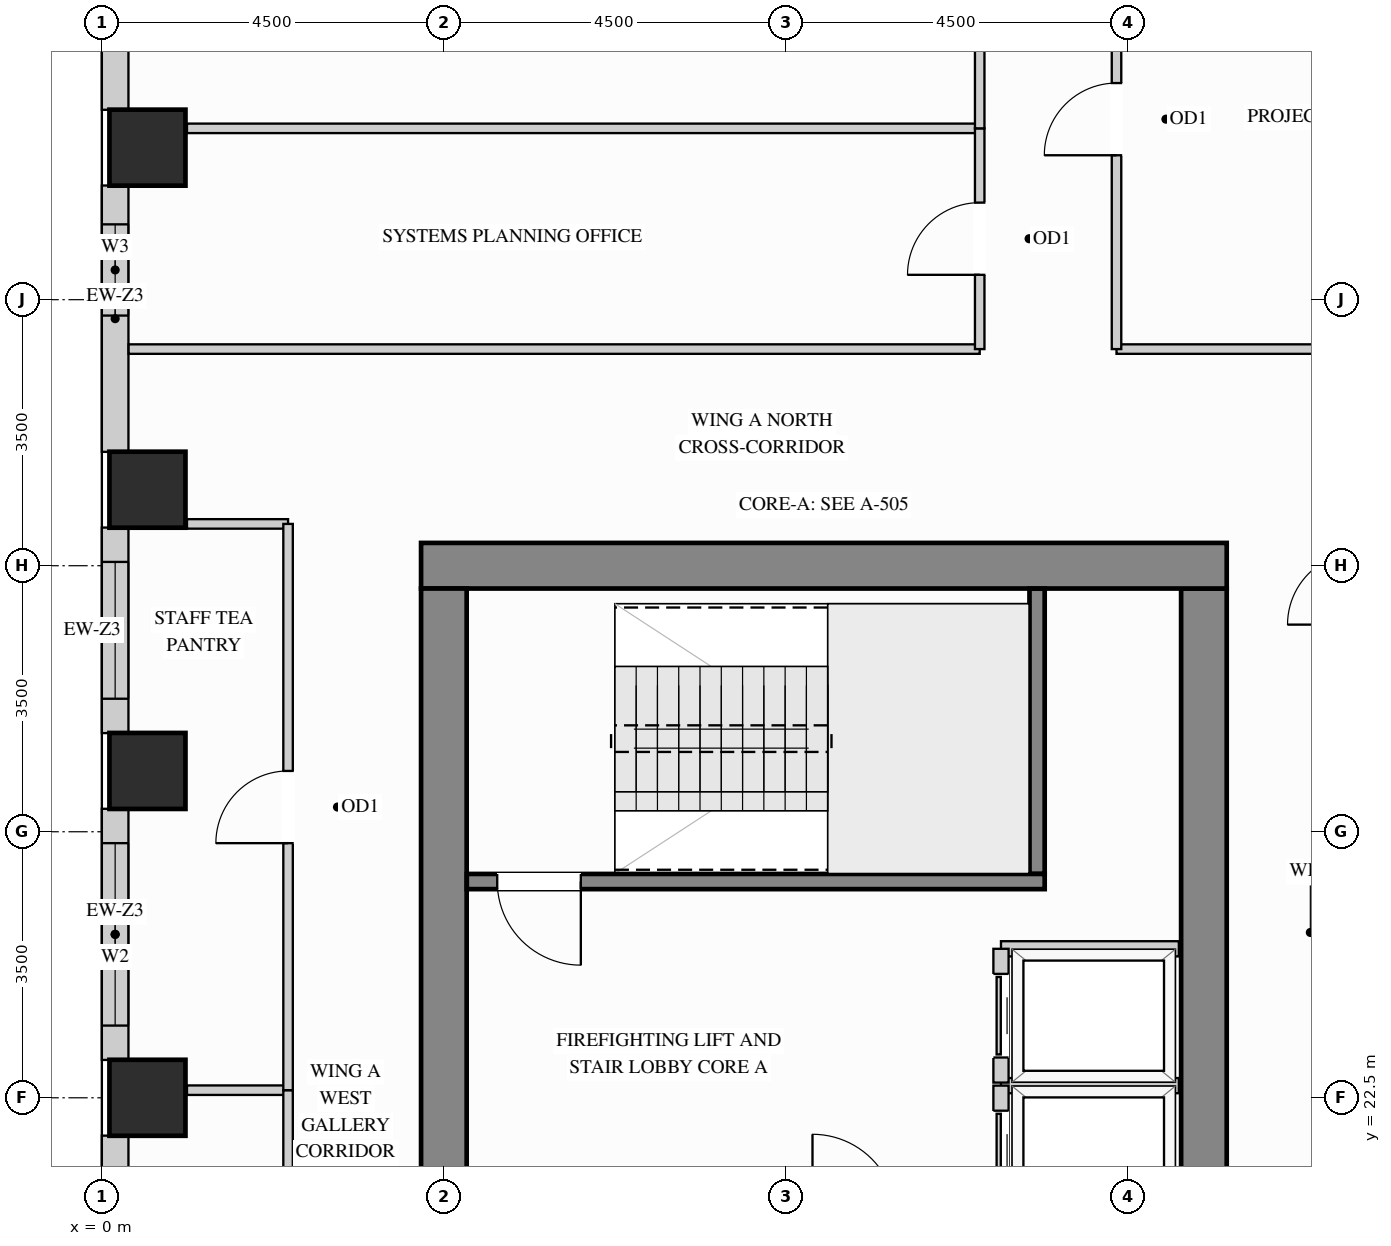
"""IFC4 building model, lengths in metres.
Left out: names, types, materials, properties, quantities, classifications, styles, units other than length and angle.
Written with IfcOpenShell. Run it as: python <this file> out.ifc"""

import sys

from ifc_helpers import new_model, si_unit, direction, frame, frame_2d, origin, origin_2d, place, context, subcontext, project, spatial, rectangle, extrude, source, transform, mapped, element, fill, save


model = new_model("IFC4")
c1 = context("Model", 3, precision=1e-05, world=origin(), true_north=direction((0.0, 1.0)))
c2 = subcontext(c1, "Body", "Model", "MODEL_VIEW")
j1 = project(units=[si_unit("LENGTHUNIT", "METRE"), si_unit("PLANEANGLEUNIT", "RADIAN")], contexts=[c1])
p1 = place(None, origin())
s1 = spatial("IfcSite", under=j1, at=p1, CompositionType="ELEMENT")
p2 = place(p1, origin())
s2 = spatial("IfcBuilding", under=s1, at=p2, CompositionType="ELEMENT")
p3 = place(p2, frame((0.0, 0.0, 146.7)))
s3 = spatial("IfcBuildingStorey", under=s2, at=p3, CompositionType="ELEMENT", Elevation=146.7)
m1 = source(origin(), c2, "Body", "SweptSolid", [
    extrude(rectangle(XDim=1.0, YDim=1.0, at=origin_2d()), origin(), (0.0, 0.0, 1.0), 3.4),
])
for number, where, z_axis, x_axis in (
    (1, (0.6, 22.5, 0.0), (0.0, 0.0, 1.0), (1.0, 0.0, 0.0)),
    (2, (0.6, 26.8, 0.0), (0.0, 0.0, 1.0), (1.0, 0.0, 0.0)),
    (3, (0.6, 30.5, 0.0), (0.0, 0.0, 1.0), (1.0, 0.0, 0.0)),
    (4, (0.6, 35.0, 0.0), (0.0, 0.0, 1.0), (1.0, 0.0, 0.0)),
):
    element("IfcColumn", number, at=place(p3, frame(where, z_axis=z_axis, x_axis=x_axis)), inside=s3, PredefinedType="COLUMN", context=c2, shape_type="MappedRepresentation", body=[
        mapped(m1, transform((0.0, 0.0, 0.0), x_axis=(1.0, 0.0, 0.0), y_axis=(0.0, 1.0, 0.0), z_axis=(0.0, 0.0, 1.0))),
    ])
m2 = source(origin(), c2, "Body", "SweptSolid", [
    extrude(rectangle(XDim=8.32, YDim=0.6, at=frame_2d((4.16, 0.0))), origin(), (0.0, 0.0, 1.0), 3.4),
])
p4 = place(p3, frame((14.5, 20.88, 0.0), z_axis=(0.0, 0.0, 1.0), x_axis=(0.0, 1.0, 0.0)))
e5 = element("IfcWall", 5, at=p4, inside=s3, PredefinedType="SHEAR", context=c2, shape_type="MappedRepresentation", body=[
    mapped(m2, transform((0.0, 0.0, 0.0), x_axis=(1.0, 0.0, 0.0), y_axis=(0.0, 1.0, 0.0), z_axis=(0.0, 0.0, 1.0))),
])
m3 = source(origin(), c2, "Body", "SweptSolid", [
    extrude(rectangle(XDim=10.6, YDim=0.6, at=frame_2d((5.3, 0.0))), origin(), (0.0, 0.0, 1.0), 3.4),
])
p5 = place(p3, frame((4.2, 29.5, 0.0), z_axis=(0.0, 0.0, 1.0), x_axis=(1.0, 0.0, 0.0)))
e6 = element("IfcWall", 6, at=p5, inside=s3, PredefinedType="SHEAR", context=c2, shape_type="MappedRepresentation", body=[
    mapped(m3, transform((0.0, 0.0, 0.0), x_axis=(1.0, 0.0, 0.0), y_axis=(0.0, 1.0, 0.0), z_axis=(0.0, 0.0, 1.0))),
])
m4 = source(origin(), c2, "Body", "SweptSolid", [
    extrude(rectangle(XDim=20.4, YDim=0.6, at=frame_2d((10.2, 0.0))), origin(), (0.0, 0.0, 1.0), 3.4),
])
p6 = place(p3, frame((4.5, 8.8, 0.0), z_axis=(0.0, 0.0, 1.0), x_axis=(0.0, 1.0, 0.0)))
e7 = element("IfcWall", 7, at=p6, inside=s3, PredefinedType="SHEAR", context=c2, shape_type="MappedRepresentation", body=[
    mapped(m4, transform((0.0, 0.0, 0.0), x_axis=(1.0, 0.0, 0.0), y_axis=(0.0, 1.0, 0.0), z_axis=(0.0, 0.0, 1.0))),
])
m5 = source(origin(), c2, "Body", "SweptSolid", [
    extrude(rectangle(XDim=1.904, YDim=0.35, at=frame_2d((0.952, 0.0))), origin(), (0.0, 0.0, 1.0), 2.612),
])
p7 = place(p3, frame((0.175, 37.402, 0.0), z_axis=(0.0, 0.0, 1.0), x_axis=(0.0, -1.0, 0.0)))
e8 = element("IfcWall", 8, at=p7, inside=s3, PredefinedType="SOLIDWALL", context=c2, shape_type="MappedRepresentation", body=[
    mapped(m5, transform((0.0, 0.0, 0.0), x_axis=(1.0, 0.0, 0.0), y_axis=(0.0, 1.0, 0.0), z_axis=(0.0, 0.0, 1.0))),
])
p8 = place(p3, frame((0.175, 34.502, 0.0), z_axis=(0.0, 0.0, 1.0), x_axis=(0.0, -1.0, 0.0)))
e9 = element("IfcWall", 9, at=p8, inside=s3, PredefinedType="SOLIDWALL", context=c2, shape_type="SweptSolid", body=[
    extrude(rectangle(XDim=3.504, YDim=0.35, at=frame_2d((1.752, 0.0))), origin(), (0.0, 0.0, 1.0), 2.612),
])
p9 = place(p8, frame((0.511, 0.0, 0.78)))
e10 = element("IfcOpeningElement", 10, at=p9, cuts=e9, PredefinedType="OPENING", context=c2, shape_type="SweptSolid", body=[
    extrude(rectangle(XDim=1.2, YDim=1.652, at=frame_2d((0.6, 0.826))), frame((0.0, 0.185, 0.0), z_axis=(0.0, -1.0, 0.0), x_axis=(1.0, 0.0, 0.0)), (0.0, 0.0, 1.0), 0.37),
])
p10 = place(p3, frame((0.175, 30.002, 0.0), z_axis=(0.0, 0.0, 1.0), x_axis=(0.0, -1.0, 0.0)))
e11 = element("IfcWall", 11, at=p10, inside=s3, PredefinedType="SOLIDWALL", context=c2, shape_type="SweptSolid", body=[
    extrude(rectangle(XDim=2.704, YDim=0.35, at=frame_2d((1.352, 0.0))), origin(), (0.0, 0.0, 1.0), 2.612),
])
p11 = place(p10, frame((0.452, 0.0, 0.78)))
e12 = element("IfcOpeningElement", 12, at=p11, cuts=e11, PredefinedType="OPENING", context=c2, shape_type="SweptSolid", body=[
    extrude(rectangle(XDim=1.8, YDim=1.652, at=frame_2d((0.9, 0.826))), frame((0.0, 0.185, 0.0), z_axis=(0.0, -1.0, 0.0), x_axis=(1.0, 0.0, 0.0)), (0.0, 0.0, 1.0), 0.37),
])
p12 = place(p3, frame((0.175, 26.302, 0.0), z_axis=(0.0, 0.0, 1.0), x_axis=(0.0, -1.0, 0.0)))
e13 = element("IfcWall", 13, at=p12, inside=s3, PredefinedType="SOLIDWALL", context=c2, shape_type="SweptSolid", body=[
    extrude(rectangle(XDim=3.304, YDim=0.35, at=frame_2d((1.652, 0.0))), origin(), (0.0, 0.0, 1.0), 2.612),
])
p13 = place(p12, frame((0.452, 0.0, 0.78)))
e14 = element("IfcOpeningElement", 14, at=p13, cuts=e13, PredefinedType="OPENING", context=c2, shape_type="SweptSolid", body=[
    extrude(rectangle(XDim=2.4, YDim=1.652, at=frame_2d((1.2, 0.826))), frame((0.0, 0.185, 0.0), z_axis=(0.0, -1.0, 0.0), x_axis=(1.0, 0.0, 0.0)), (0.0, 0.0, 1.0), 0.37),
])
p14 = place(p3, frame((0.175, 22.002, 0.0), z_axis=(0.0, 0.0, 1.0), x_axis=(0.0, -1.0, 0.0)))
e15 = element("IfcWall", 15, at=p14, inside=s3, PredefinedType="SOLIDWALL", context=c2, shape_type="SweptSolid", body=[
    extrude(rectangle(XDim=3.504, YDim=0.35, at=frame_2d((1.752, 0.0))), origin(), (0.0, 0.0, 1.0), 2.612),
])
p15 = place(p14, frame((0.552, 0.0, 0.78)))
e16 = element("IfcOpeningElement", 16, at=p15, cuts=e15, PredefinedType="OPENING", context=c2, shape_type="SweptSolid", body=[
    extrude(rectangle(XDim=2.4, YDim=1.652, at=frame_2d((1.2, 0.826))), frame((0.0, 0.185, 0.0), z_axis=(0.0, -1.0, 0.0), x_axis=(1.0, 0.0, 0.0)), (0.0, 0.0, 1.0), 0.37),
])
m6 = source(origin(), c2, "Body", "SweptSolid", [
    extrude(rectangle(XDim=5.798, YDim=0.125, at=frame_2d((2.899, 0.0))), origin(), (0.0, 0.0, 1.0), 3.385),
])
p16 = place(p3, frame((13.35, 32.35, 0.0), z_axis=(0.0, 0.0, 1.0), x_axis=(1.0, 0.0, 0.0)))
e17 = element("IfcWall", 17, at=p16, inside=s3, PredefinedType="PARTITIONING", context=c2, shape_type="MappedRepresentation", body=[
    mapped(m6, transform((0.0, 0.0, 0.0), x_axis=(1.0, 0.0, 0.0), y_axis=(0.0, 1.0, 0.0), z_axis=(0.0, 0.0, 1.0))),
])
m7 = source(origin(), c2, "Body", "SweptSolid", [
    extrude(rectangle(XDim=11.198, YDim=0.125, at=frame_2d((5.599, 0.0))), origin(), (0.0, 0.0, 1.0), 3.385),
])
p17 = place(p3, frame((0.352, 32.35, 0.0), z_axis=(0.0, 0.0, 1.0), x_axis=(1.0, 0.0, 0.0)))
e18 = element("IfcWall", 18, at=p17, inside=s3, PredefinedType="PARTITIONING", context=c2, shape_type="MappedRepresentation", body=[
    mapped(m7, transform((0.0, 0.0, 0.0), x_axis=(1.0, 0.0, 0.0), y_axis=(0.0, 1.0, 0.0), z_axis=(0.0, 0.0, 1.0))),
])
m8 = source(origin(), c2, "Body", "SweptSolid", [
    extrude(rectangle(XDim=10.43, YDim=0.125, at=frame_2d((5.215, 0.0))), origin(), (0.0, 0.0, 1.0), 3.385),
])
p18 = place(p3, frame((1.12, 35.254, 0.0), z_axis=(0.0, 0.0, 1.0), x_axis=(1.0, 0.0, 0.0)))
e19 = element("IfcWall", 19, at=p18, inside=s3, PredefinedType="PARTITIONING", context=c2, shape_type="MappedRepresentation", body=[
    mapped(m8, transform((0.0, 0.0, 0.0), x_axis=(1.0, 0.0, 0.0), y_axis=(0.0, 1.0, 0.0), z_axis=(0.0, 0.0, 1.0))),
])
m9 = source(origin(), c2, "Body", "SweptSolid", [
    extrude(rectangle(XDim=1.33, YDim=0.125, at=frame_2d((0.665, 0.0))), origin(), (0.0, 0.0, 1.0), 3.385),
])
p19 = place(p3, frame((1.12, 30.05, 0.0), z_axis=(0.0, 0.0, 1.0), x_axis=(1.0, 0.0, 0.0)))
e20 = element("IfcWall", 20, at=p19, inside=s3, PredefinedType="PARTITIONING", context=c2, shape_type="MappedRepresentation", body=[
    mapped(m9, transform((0.0, 0.0, 0.0), x_axis=(1.0, 0.0, 0.0), y_axis=(0.0, 1.0, 0.0), z_axis=(0.0, 0.0, 1.0))),
])
p20 = place(p3, frame((13.35, 32.35, 0.0), z_axis=(0.0, 0.0, 1.0), x_axis=(0.0, 1.0, 0.0)))
e21 = element("IfcWall", 21, at=p20, inside=s3, PredefinedType="PARTITIONING", context=c2, shape_type="SweptSolid", body=[
    extrude(rectangle(XDim=6.05, YDim=0.125, at=frame_2d((3.025, 0.0))), origin(), (0.0, 0.0, 1.0), 3.385),
])
p21 = place(p20, frame((2.55, 0.0, 0.0)))
e22 = element("IfcOpeningElement", 22, at=p21, cuts=e21, PredefinedType="OPENING", context=c2, shape_type="SweptSolid", body=[
    extrude(rectangle(XDim=0.95, YDim=2.15, at=frame_2d((0.475, 1.075))), frame((0.0, 0.073, 0.0), z_axis=(0.0, -1.0, 0.0), x_axis=(1.0, 0.0, 0.0)), (0.0, 0.0, 1.0), 0.145),
])
p22 = place(p3, frame((11.55, 32.35, 0.0), z_axis=(0.0, 0.0, 1.0), x_axis=(0.0, 1.0, 0.0)))
e23 = element("IfcWall", 23, at=p22, inside=s3, PredefinedType="PARTITIONING", context=c2, shape_type="SweptSolid", body=[
    extrude(rectangle(XDim=2.904, YDim=0.125, at=frame_2d((1.452, 0.0))), origin(), (0.0, 0.0, 1.0), 3.385),
])
p23 = place(p22, frame((0.977, 0.0, 0.0)))
e24 = element("IfcOpeningElement", 24, at=p23, cuts=e23, PredefinedType="OPENING", context=c2, shape_type="SweptSolid", body=[
    extrude(rectangle(XDim=0.95, YDim=2.15, at=frame_2d((0.475, 1.075))), frame((0.0, 0.073, 0.0), z_axis=(0.0, -1.0, 0.0), x_axis=(1.0, 0.0, 0.0)), (0.0, 0.0, 1.0), 0.145),
])
p24 = place(p3, frame((11.55, 35.254, 0.0), z_axis=(0.0, 0.0, 1.0), x_axis=(0.0, 1.0, 0.0)))
e25 = element("IfcWall", 25, at=p24, inside=s3, PredefinedType="PARTITIONING", context=c2, shape_type="SweptSolid", body=[
    extrude(rectangle(XDim=3.146, YDim=0.125, at=frame_2d((1.573, 0.0))), origin(), (0.0, 0.0, 1.0), 3.385),
])
p25 = place(p24, frame((1.098, 0.0, 0.0)))
e26 = element("IfcOpeningElement", 26, at=p25, cuts=e25, PredefinedType="OPENING", context=c2, shape_type="SweptSolid", body=[
    extrude(rectangle(XDim=0.95, YDim=2.15, at=frame_2d((0.475, 1.075))), frame((0.0, 0.073, 0.0), z_axis=(0.0, -1.0, 0.0), x_axis=(1.0, 0.0, 0.0)), (0.0, 0.0, 1.0), 0.145),
])
p26 = place(p3, frame((1.12, 22.6, 0.0), z_axis=(0.0, 0.0, 1.0), x_axis=(1.0, 0.0, 0.0)))
e27 = element("IfcWall", 27, at=p26, inside=s3, PredefinedType="PARTITIONING", context=c2, shape_type="MappedRepresentation", body=[
    mapped(m9, transform((0.0, 0.0, 0.0), x_axis=(1.0, 0.0, 0.0), y_axis=(0.0, 1.0, 0.0), z_axis=(0.0, 0.0, 1.0))),
])
p27 = place(p3, frame((2.45, 15.1, 0.0), z_axis=(0.0, 0.0, 1.0), x_axis=(0.0, 1.0, 0.0)))
e28 = element("IfcWall", 28, at=p27, inside=s3, PredefinedType="PARTITIONING", context=c2, shape_type="SweptSolid", body=[
    extrude(rectangle(XDim=7.5, YDim=0.125, at=frame_2d((3.75, 0.0))), origin(), (0.0, 0.0, 1.0), 3.385),
])
p28 = place(p27, frame((3.275, 0.0, 0.0)))
e29 = element("IfcOpeningElement", 29, at=p28, cuts=e28, PredefinedType="OPENING", context=c2, shape_type="SweptSolid", body=[
    extrude(rectangle(XDim=0.95, YDim=2.15, at=frame_2d((0.475, 1.075))), frame((0.0, 0.073, 0.0), z_axis=(0.0, -1.0, 0.0), x_axis=(1.0, 0.0, 0.0)), (0.0, 0.0, 1.0), 0.145),
])
p29 = place(p3, frame((2.45, 22.6, 0.0), z_axis=(0.0, 0.0, 1.0), x_axis=(0.0, 1.0, 0.0)))
e30 = element("IfcWall", 30, at=p29, inside=s3, PredefinedType="PARTITIONING", context=c2, shape_type="SweptSolid", body=[
    extrude(rectangle(XDim=7.45, YDim=0.125, at=frame_2d((3.725, 0.0))), origin(), (0.0, 0.0, 1.0), 3.385),
])
p30 = place(p29, frame((3.25, 0.0, 0.0)))
e31 = element("IfcOpeningElement", 31, at=p30, cuts=e30, PredefinedType="OPENING", context=c2, shape_type="SweptSolid", body=[
    extrude(rectangle(XDim=0.95, YDim=2.15, at=frame_2d((0.475, 1.075))), frame((0.0, 0.073, 0.0), z_axis=(0.0, -1.0, 0.0), x_axis=(1.0, 0.0, 0.0)), (0.0, 0.0, 1.0), 0.145),
])
m10 = source(origin(), c2, "Body", "SweptSolid", [
    extrude(rectangle(XDim=2.34, YDim=0.2, at=frame_2d((1.17, 0.0))), origin(), (0.0, 0.0, 1.0), 3.385),
])
p31 = place(p3, frame((11.83, 22.66, 0.0), z_axis=(0.0, 0.0, 1.0), x_axis=(1.0, 0.0, 0.0)))
e32 = element("IfcWall", 32, at=p31, inside=s3, PredefinedType="PARTITIONING", context=c2, shape_type="MappedRepresentation", body=[
    mapped(m10, transform((0.0, 0.0, 0.0), x_axis=(1.0, 0.0, 0.0), y_axis=(0.0, 1.0, 0.0), z_axis=(0.0, 0.0, 1.0))),
])
p32 = place(p3, frame((11.83, 20.9, 0.0), z_axis=(0.0, 0.0, 1.0), x_axis=(0.0, 1.0, 0.0)))
e33 = element("IfcWall", 33, at=p32, inside=s3, PredefinedType="PARTITIONING", context=c2, shape_type="SweptSolid", body=[
    extrude(rectangle(XDim=1.76, YDim=0.2, at=frame_2d((0.88, 0.0))), origin(), (0.0, 0.0, 1.0), 3.385),
])
p33 = place(p32, frame((0.33, 0.0, 0.0)))
e34 = element("IfcOpeningElement", 34, at=p33, cuts=e33, PredefinedType="OPENING", context=c2, shape_type="SweptSolid", body=[
    extrude(rectangle(XDim=1.1, YDim=2.2, at=frame_2d((0.55, 1.1))), frame((0.0, 0.11, 0.0), z_axis=(0.0, -1.0, 0.0), x_axis=(1.0, 0.0, 0.0)), (0.0, 0.0, 1.0), 0.22),
])
p34 = place(p3, frame((11.83, 24.46, 0.0), z_axis=(0.0, 0.0, 1.0), x_axis=(1.0, 0.0, 0.0)))
e35 = element("IfcWall", 35, at=p34, inside=s3, PredefinedType="PARTITIONING", context=c2, shape_type="MappedRepresentation", body=[
    mapped(m10, transform((0.0, 0.0, 0.0), x_axis=(1.0, 0.0, 0.0), y_axis=(0.0, 1.0, 0.0), z_axis=(0.0, 0.0, 1.0))),
])
p35 = place(p3, frame((11.83, 22.7, 0.0), z_axis=(0.0, 0.0, 1.0), x_axis=(0.0, 1.0, 0.0)))
e36 = element("IfcWall", 36, at=p35, inside=s3, PredefinedType="PARTITIONING", context=c2, shape_type="SweptSolid", body=[
    extrude(rectangle(XDim=1.76, YDim=0.2, at=frame_2d((0.88, 0.0))), origin(), (0.0, 0.0, 1.0), 3.385),
])
p36 = place(p35, frame((0.33, 0.0, 0.0)))
e37 = element("IfcOpeningElement", 37, at=p36, cuts=e36, PredefinedType="OPENING", context=c2, shape_type="SweptSolid", body=[
    extrude(rectangle(XDim=1.1, YDim=2.2, at=frame_2d((0.55, 1.1))), frame((0.0, 0.11, 0.0), z_axis=(0.0, -1.0, 0.0), x_axis=(1.0, 0.0, 0.0)), (0.0, 0.0, 1.0), 0.22),
])
m11 = source(origin(), c2, "Body", "SweptSolid", [
    extrude(rectangle(XDim=3.753, YDim=0.2, at=frame_2d((1.876, 0.0))), origin(), (0.0, 0.0, 1.0), 3.4),
])
p37 = place(p3, frame((12.305, 25.445, 0.0), z_axis=(0.0, 0.0, 1.0), x_axis=(0.0, 1.0, 0.0)))
e38 = element("IfcWall", 38, at=p37, inside=s3, PredefinedType="SHEAR", context=c2, shape_type="MappedRepresentation", body=[
    mapped(m11, transform((0.0, 0.0, 0.0), x_axis=(1.0, 0.0, 0.0), y_axis=(0.0, 1.0, 0.0), z_axis=(0.0, 0.0, 1.0))),
])
p38 = place(p3, frame((4.802, 25.345, 0.0), z_axis=(0.0, 0.0, 1.0), x_axis=(1.0, 0.0, 0.0)))
e39 = element("IfcWall", 39, at=p38, inside=s3, PredefinedType="SHEAR", context=c2, shape_type="SweptSolid", body=[
    extrude(rectangle(XDim=7.603, YDim=0.2, at=frame_2d((3.802, 0.0))), origin(), (0.0, 0.0, 1.0), 3.4),
])
p39 = place(p38, frame((0.4, 0.0, 0.0)))
e40 = element("IfcOpeningElement", 40, at=p39, cuts=e39, PredefinedType="OPENING", context=c2, shape_type="SweptSolid", body=[
    extrude(rectangle(XDim=1.1, YDim=2.15, at=frame_2d((0.55, 1.075))), frame((0.0, 0.11, 0.0), z_axis=(0.0, -1.0, 0.0), x_axis=(1.0, 0.0, 0.0)), (0.0, 0.0, 1.0), 0.22),
])
m12 = source(origin(), c2, "Body", "SweptSolid", [
    extrude(rectangle(XDim=1.1, YDim=2.2, at=frame_2d((0.55, 1.1))), frame((0.0, 0.025, 0.0), z_axis=(0.0, -1.0, 0.0), x_axis=(1.0, 0.0, 0.0)), (0.0, 0.0, 1.0), 0.05),
])
p40 = place(p33, origin())
e41 = element("IfcDoor", 41, at=p40, inside=s3, OperationType="SLIDING_TO_LEFT", PredefinedType="DOOR", context=c2, shape_type="MappedRepresentation", body=[
    mapped(m12, transform((0.0, 0.0, 0.0), x_axis=(1.0, 0.0, 0.0), y_axis=(0.0, 1.0, 0.0), z_axis=(0.0, 0.0, 1.0))),
])
fill(e34, e41)
p41 = place(p36, origin())
e42 = element("IfcDoor", 42, at=p41, inside=s3, OperationType="SLIDING_TO_LEFT", PredefinedType="DOOR", context=c2, shape_type="MappedRepresentation", body=[
    mapped(m12, transform((0.0, 0.0, 0.0), x_axis=(1.0, 0.0, 0.0), y_axis=(0.0, 1.0, 0.0), z_axis=(0.0, 0.0, 1.0))),
])
fill(e37, e42)
m13 = source(origin(), c2, "Body", "SweptSolid", [
    extrude(rectangle(XDim=0.95, YDim=2.15, at=frame_2d((0.475, 1.075))), frame((0.0, 0.025, 0.0), z_axis=(0.0, -1.0, 0.0), x_axis=(1.0, 0.0, 0.0)), (0.0, 0.0, 1.0), 0.05),
])
p42 = place(p21, origin())
e43 = element("IfcDoor", 43, at=p42, inside=s3, OperationType="SINGLE_SWING_LEFT", PredefinedType="DOOR", context=c2, shape_type="MappedRepresentation", body=[
    mapped(m13, transform((0.0, 0.0, 0.0), x_axis=(1.0, 0.0, 0.0), y_axis=(0.0, 1.0, 0.0), z_axis=(0.0, 0.0, 1.0))),
])
fill(e22, e43)
p43 = place(p23, origin())
e44 = element("IfcDoor", 44, at=p43, inside=s3, OperationType="SINGLE_SWING_LEFT", PredefinedType="DOOR", context=c2, shape_type="MappedRepresentation", body=[
    mapped(m13, transform((0.0, 0.0, 0.0), x_axis=(1.0, 0.0, 0.0), y_axis=(0.0, 1.0, 0.0), z_axis=(0.0, 0.0, 1.0))),
])
fill(e24, e44)
p44 = place(p30, origin())
e45 = element("IfcDoor", 45, at=p44, inside=s3, OperationType="SINGLE_SWING_LEFT", PredefinedType="DOOR", context=c2, shape_type="MappedRepresentation", body=[
    mapped(m13, transform((0.0, 0.0, 0.0), x_axis=(1.0, 0.0, 0.0), y_axis=(0.0, 1.0, 0.0), z_axis=(0.0, 0.0, 1.0))),
])
fill(e31, e45)
m14 = source(origin(), c2, "Body", "SweptSolid", [
    extrude(rectangle(XDim=1.1, YDim=2.15, at=frame_2d((0.55, 1.075))), frame((0.0, 0.025, 0.0), z_axis=(0.0, -1.0, 0.0), x_axis=(1.0, 0.0, 0.0)), (0.0, 0.0, 1.0), 0.05),
])
p45 = place(p39, origin())
e46 = element("IfcDoor", 46, at=p45, inside=s3, OperationType="SINGLE_SWING_RIGHT", PredefinedType="DOOR", context=c2, shape_type="MappedRepresentation", body=[
    mapped(m14, transform((0.0, 0.0, 0.0), x_axis=(1.0, 0.0, 0.0), y_axis=(0.0, 1.0, 0.0), z_axis=(0.0, 0.0, 1.0))),
])
fill(e40, e46)
m15 = source(origin(), c2, "Body", "SweptSolid", [
    extrude(rectangle(XDim=1.8, YDim=1.652, at=frame_2d((0.9, 0.826))), frame((0.0, 0.03, 0.0), z_axis=(0.0, -1.0, 0.0), x_axis=(1.0, 0.0, 0.0)), (0.0, 0.0, 1.0), 0.06),
])
p46 = place(p11, origin())
e47 = element("IfcWindow", 47, at=p46, inside=s3, PartitioningType="SINGLE_PANEL", PredefinedType="WINDOW", context=c2, shape_type="MappedRepresentation", body=[
    mapped(m15, transform((0.0, 0.0, 0.0), x_axis=(1.0, 0.0, 0.0), y_axis=(0.0, 1.0, 0.0), z_axis=(0.0, 0.0, 1.0))),
])
fill(e12, e47)
m16 = source(origin(), c2, "Body", "SweptSolid", [
    extrude(rectangle(XDim=2.4, YDim=1.652, at=frame_2d((1.2, 0.826))), frame((0.0, 0.03, 0.0), z_axis=(0.0, -1.0, 0.0), x_axis=(1.0, 0.0, 0.0)), (0.0, 0.0, 1.0), 0.06),
])
p47 = place(p13, origin())
e48 = element("IfcWindow", 48, at=p47, inside=s3, PartitioningType="SINGLE_PANEL", PredefinedType="WINDOW", context=c2, shape_type="MappedRepresentation", body=[
    mapped(m16, transform((0.0, 0.0, 0.0), x_axis=(1.0, 0.0, 0.0), y_axis=(0.0, 1.0, 0.0), z_axis=(0.0, 0.0, 1.0))),
])
fill(e14, e48)
m17 = source(origin(), c2, "Body", "SweptSolid", [
    extrude(rectangle(XDim=1.2, YDim=1.652, at=frame_2d((0.6, 0.826))), frame((0.0, 0.03, 0.0), z_axis=(0.0, -1.0, 0.0), x_axis=(1.0, 0.0, 0.0)), (0.0, 0.0, 1.0), 0.06),
])
p48 = place(p9, origin())
e49 = element("IfcWindow", 49, at=p48, inside=s3, PartitioningType="SINGLE_PANEL", PredefinedType="WINDOW", context=c2, shape_type="MappedRepresentation", body=[
    mapped(m17, transform((0.0, 0.0, 0.0), x_axis=(1.0, 0.0, 0.0), y_axis=(0.0, 1.0, 0.0), z_axis=(0.0, 0.0, 1.0))),
])
fill(e10, e49)
save(model, sys.argv[1])
